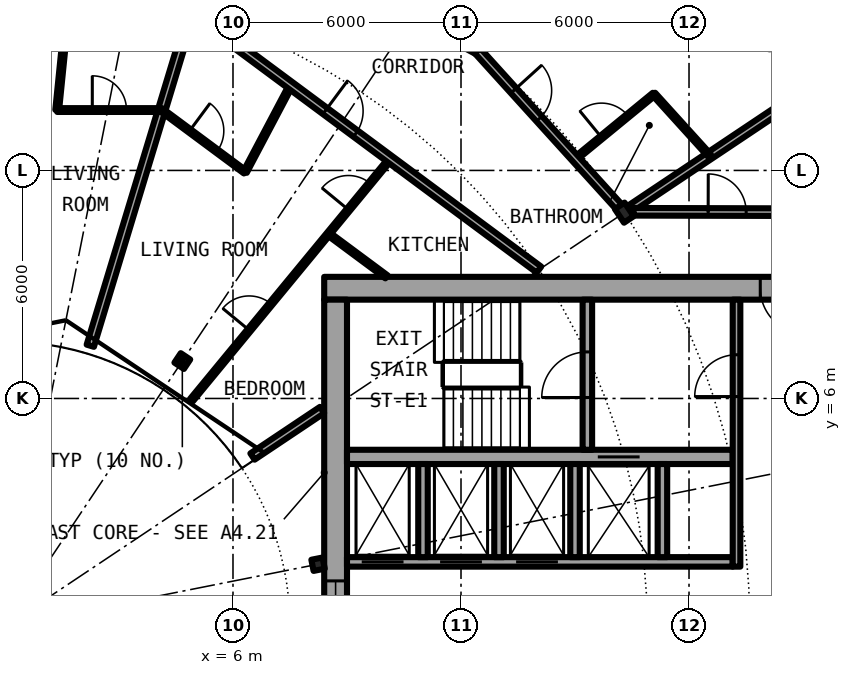
"""IFC4 building model, lengths in metres.
Left out: names, types, materials, properties, quantities, classifications, styles, units other than length and angle.
Written with IfcOpenShell. Run it as: python <this file> out.ifc"""

import sys

from ifc_helpers import new_model, si_unit, direction, frame, frame_2d, origin, origin_2d, place, context, subcontext, project, spatial, rectangle, i_section, extrude, element, fill, save


model = new_model("IFC4")
c1 = context("Model", 3, precision=1e-05, world=origin(), true_north=direction((0.0, 1.0)))
c2 = subcontext(c1, "Body", "Model", "MODEL_VIEW")
j1 = project(units=[si_unit("LENGTHUNIT", "METRE"), si_unit("PLANEANGLEUNIT", "RADIAN")], contexts=[c1])
p1 = place(None, origin())
s1 = spatial("IfcSite", under=j1, at=p1, CompositionType="ELEMENT")
p2 = place(p1, origin())
s2 = spatial("IfcBuilding", under=s1, at=p2, CompositionType="ELEMENT")
p3 = place(p2, frame((0.0, 0.0, 117.75)))
s3 = spatial("IfcBuildingStorey", under=s2, at=p3, CompositionType="ELEMENT", Elevation=117.75)
p4 = place(p3, frame((16.297, 10.889, 0.0), z_axis=(0.0, 0.0, 1.0), x_axis=(0.831469612303, 0.55557023302, 0.0)))
e1 = element("IfcColumn", 1, at=p4, inside=s3, PredefinedType="COLUMN", context=c2, shape_type="SweptSolid", body=[
    extrude(i_section(OverallWidth=0.307, OverallDepth=0.432, WebThickness=0.021, FlangeThickness=0.04, FilletRadius=0.027, at=origin_2d()), origin(), (0.0, 0.0, 1.0), 3.05),
])
for number, where, z_axis, x_axis in (
    (2, (8.239, 1.639, 0.0), (0.0, 0.0, 1.0), (0.981, 0.195, 0.0)),
    (3, (4.667, 6.984, 0.0), (0.0, 0.0, 1.0), (0.556, 0.831, 0.0)),
):
    element("IfcColumn", number, at=place(p3, frame(where, z_axis=z_axis, x_axis=x_axis)), inside=s3, PredefinedType="COLUMN", context=c2, shape_type="SweptSolid", body=[
        extrude(i_section(OverallWidth=0.3, OverallDepth=0.3, WebThickness=0.011, FlangeThickness=0.019, FilletRadius=0.027, at=origin_2d()), origin(), (0.0, 0.0, 1.0), 3.05),
    ])
p5 = place(p3, frame((22.699, 15.167, 0.0), z_axis=(0.0, 0.0, 1.0), x_axis=(-0.634382322723, 0.773019449054, 0.0)))
e4 = element("IfcWall", 4, at=p5, inside=s3, PredefinedType="SOLIDWALL", context=c2, shape_type="SweptSolid", body=[
    extrude(rectangle(XDim=5.352, YDim=0.25, at=frame_2d((2.676, 0.0))), origin(), (0.0, 0.0, 1.0), 2.7),
])
p6 = place(p5, frame((0.441, 0.0, 0.3)))
e5 = element("IfcOpeningElement", 5, at=p6, cuts=e4, PredefinedType="OPENING", context=c2, shape_type="SweptSolid", body=[
    extrude(rectangle(XDim=1.8, YDim=2.1, at=frame_2d((0.9, 1.05))), frame((0.0, 0.135, 0.0), z_axis=(0.0, -1.0, 0.0), x_axis=(1.0, 0.0, 0.0)), (0.0, 0.0, 1.0), 0.27),
])
p7 = place(p5, frame((3.51, 0.0, 0.0)))
e6 = element("IfcOpeningElement", 6, at=p7, cuts=e4, PredefinedType="OPENING", context=c2, shape_type="SweptSolid", body=[
    extrude(rectangle(XDim=1.0, YDim=2.2, at=frame_2d((0.5, 1.1))), frame((0.0, 0.135, 0.0), z_axis=(0.0, -1.0, 0.0), x_axis=(1.0, 0.0, 0.0)), (0.0, 0.0, 1.0), 0.27),
])
p8 = place(p3, frame((22.2, 8.9, 0.0), z_axis=(0.0, 0.0, 1.0), x_axis=(-1.0, 0.0, 0.0)))
e7 = element("IfcWall", 7, at=p8, inside=s3, PredefinedType="SHEAR", context=c2, shape_type="SweptSolid", body=[
    extrude(rectangle(XDim=13.8, YDim=0.6, at=frame_2d((6.9, 0.0))), origin(), (0.0, 0.0, 1.0), 3.05),
])
p9 = place(p8, frame((1.125, 0.0, 0.0)))
e8 = element("IfcOpeningElement", 8, at=p9, cuts=e7, PredefinedType="OPENING", context=c2, shape_type="SweptSolid", body=[
    extrude(rectangle(XDim=1.2, YDim=2.3, at=frame_2d((0.6, 1.15))), frame((0.0, 0.31, 0.0), z_axis=(0.0, -1.0, 0.0), x_axis=(1.0, 0.0, 0.0)), (0.0, 0.0, 1.0), 0.62),
])
p10 = place(p3, frame((8.7, -8.6, 0.0), z_axis=(0.0, 0.0, 1.0), x_axis=(0.0, 1.0, 0.0)))
e9 = element("IfcWall", 9, at=p10, inside=s3, PredefinedType="SHEAR", context=c2, shape_type="SweptSolid", body=[
    extrude(rectangle(XDim=17.2, YDim=0.6, at=frame_2d((8.6, 0.0))), origin(), (0.0, 0.0, 1.0), 3.05),
])
p11 = place(p10, frame((7.4, 0.0, 0.1)))
e10 = element("IfcOpeningElement", 10, at=p11, cuts=e9, PredefinedType="OPENING", context=c2, shape_type="SweptSolid", body=[
    extrude(rectangle(XDim=2.4, YDim=2.2, at=frame_2d((1.2, 1.1))), frame((0.0, 0.31, 0.0), z_axis=(0.0, -1.0, 0.0), x_axis=(1.0, 0.0, 0.0)), (0.0, 0.0, 1.0), 0.62),
])
p12 = place(p3, frame((9.0, 1.7, 0.0), z_axis=(0.0, 0.0, 1.0), x_axis=(1.0, 0.0, 0.0)))
e11 = element("IfcWall", 11, at=p12, inside=s3, PredefinedType="SHEAR", context=c2, shape_type="SweptSolid", body=[
    extrude(rectangle(XDim=10.15, YDim=0.25, at=frame_2d((5.075, 0.0))), origin(), (0.0, 0.0, 1.0), 3.05),
])
p13 = place(p12, frame((0.387, 0.0, 0.0)))
e12 = element("IfcOpeningElement", 12, at=p13, cuts=e11, PredefinedType="OPENING", context=c2, shape_type="SweptSolid", body=[
    extrude(rectangle(XDim=1.1, YDim=2.3, at=frame_2d((0.55, 1.15))), frame((0.0, 0.135, 0.0), z_axis=(0.0, -1.0, 0.0), x_axis=(1.0, 0.0, 0.0)), (0.0, 0.0, 1.0), 0.27),
])
p14 = place(p12, frame((2.45, 0.0, 0.0)))
e13 = element("IfcOpeningElement", 13, at=p14, cuts=e11, PredefinedType="OPENING", context=c2, shape_type="SweptSolid", body=[
    extrude(rectangle(XDim=1.1, YDim=2.3, at=frame_2d((0.55, 1.15))), frame((0.0, 0.135, 0.0), z_axis=(0.0, -1.0, 0.0), x_axis=(1.0, 0.0, 0.0)), (0.0, 0.0, 1.0), 0.27),
])
p15 = place(p12, frame((4.45, 0.0, 0.0)))
e14 = element("IfcOpeningElement", 14, at=p15, cuts=e11, PredefinedType="OPENING", context=c2, shape_type="SweptSolid", body=[
    extrude(rectangle(XDim=1.1, YDim=2.3, at=frame_2d((0.55, 1.15))), frame((0.0, 0.135, 0.0), z_axis=(0.0, -1.0, 0.0), x_axis=(1.0, 0.0, 0.0)), (0.0, 0.0, 1.0), 0.27),
])
p16 = place(p3, frame((9.0, 4.462, 0.0), z_axis=(0.0, 0.0, 1.0), x_axis=(1.0, 0.0, 0.0)))
e15 = element("IfcWall", 15, at=p16, inside=s3, PredefinedType="SHEAR", context=c2, shape_type="SweptSolid", body=[
    extrude(rectangle(XDim=10.15, YDim=0.375, at=frame_2d((5.075, 0.0))), origin(), (0.0, 0.0, 1.0), 3.05),
])
p17 = place(p16, frame((6.6, 0.0, 0.0)))
e16 = element("IfcOpeningElement", 16, at=p17, cuts=e15, PredefinedType="OPENING", context=c2, shape_type="SweptSolid", body=[
    extrude(rectangle(XDim=1.1, YDim=2.3, at=frame_2d((0.55, 1.15))), frame((0.0, 0.198, 0.0), z_axis=(0.0, -1.0, 0.0), x_axis=(1.0, 0.0, 0.0)), (0.0, 0.0, 1.0), 0.395),
])
p18 = place(p3, frame((15.325, 4.65, 0.0), z_axis=(0.0, 0.0, 1.0), x_axis=(0.0, 1.0, 0.0)))
e17 = element("IfcWall", 17, at=p18, inside=s3, PredefinedType="SHEAR", context=c2, shape_type="SweptSolid", body=[
    extrude(rectangle(XDim=3.95, YDim=0.25, at=frame_2d((1.975, 0.0))), origin(), (0.0, 0.0, 1.0), 3.05),
])
p19 = place(p18, frame((1.375, 0.0, 0.0)))
e18 = element("IfcOpeningElement", 18, at=p19, cuts=e17, PredefinedType="OPENING", context=c2, shape_type="SweptSolid", body=[
    extrude(rectangle(XDim=1.2, YDim=2.3, at=frame_2d((0.6, 1.15))), frame((0.0, 0.135, 0.0), z_axis=(0.0, -1.0, 0.0), x_axis=(1.0, 0.0, 0.0)), (0.0, 0.0, 1.0), 0.27),
])
for number, where, z_axis, x_axis in (
    (19, (15.0, 1.825, 0.0), (0.0, 0.0, 1.0), (0.0, 1.0, 0.0)),
    (20, (17.3, 1.825, 0.0), (0.0, 0.0, 1.0), (0.0, 1.0, 0.0)),
):
    element("IfcWall", number, at=place(p3, frame(where, z_axis=z_axis, x_axis=x_axis)), inside=s3, PredefinedType="SOLIDWALL", context=c2, shape_type="SweptSolid", body=[
        extrude(rectangle(XDim=2.45, YDim=0.25, at=frame_2d((1.225, 0.0))), origin(), (0.0, 0.0, 1.0), 2.7),
    ])
p20 = place(p3, frame((19.25, 1.575, 0.0), z_axis=(0.0, 0.0, 1.0), x_axis=(0.0, 1.0, 0.0)))
e21 = element("IfcWall", 21, at=p20, inside=s3, PredefinedType="SOLIDWALL", context=c2, shape_type="SweptSolid", body=[
    extrude(rectangle(XDim=7.025, YDim=0.2, at=frame_2d((3.513, 0.0))), origin(), (0.0, 0.0, 1.0), 2.7),
])
p21 = place(p20, frame((4.475, 0.0, 0.0)))
e22 = element("IfcOpeningElement", 22, at=p21, cuts=e21, PredefinedType="OPENING", context=c2, shape_type="SweptSolid", body=[
    extrude(rectangle(XDim=1.1, YDim=2.3, at=frame_2d((0.55, 1.15))), frame((0.0, 0.11, 0.0), z_axis=(0.0, -1.0, 0.0), x_axis=(1.0, 0.0, 0.0)), (0.0, 0.0, 1.0), 0.22),
])
for number, where, z_axis, x_axis in (
    (23, (11.0, 1.825, 0.0), (0.0, 0.0, 1.0), (0.0, 1.0, 0.0)),
    (24, (13.0, 1.825, 0.0), (0.0, 0.0, 1.0), (0.0, 1.0, 0.0)),
):
    element("IfcWall", number, at=place(p3, frame(where, z_axis=z_axis, x_axis=x_axis)), inside=s3, PredefinedType="SOLIDWALL", context=c2, shape_type="SweptSolid", body=[
        extrude(rectangle(XDim=2.45, YDim=0.25, at=frame_2d((1.225, 0.0))), origin(), (0.0, 0.0, 1.0), 2.7),
    ])
p22 = place(p3, frame((2.245, 7.387, 0.0), z_axis=(0.0, 0.0, 1.0), x_axis=(0.289977130626, 0.957033575019, 0.0)))
e25 = element("IfcWall", 25, at=p22, inside=s3, PredefinedType="PARTITIONING", context=c2, shape_type="SweptSolid", body=[
    extrude(rectangle(XDim=9.18, YDim=0.2, at=frame_2d((4.59, 0.0))), origin(), (0.0, 0.0, 1.0), 2.7),
])
p23 = place(p3, frame((1.374, 13.589, 0.0), z_axis=(0.0, 0.0, 1.0), x_axis=(0.100527855112, 0.994934244233, 0.0)))
e26 = element("IfcWall", 26, at=p23, inside=s3, PredefinedType="PARTITIONING", context=c2, shape_type="SweptSolid", body=[
    extrude(rectangle(XDim=2.596, YDim=0.1, at=frame_2d((1.298, 0.0))), origin(), (0.0, 0.0, 1.0), 2.7),
])
p24 = place(p3, frame((4.909, 5.958, 0.0), z_axis=(0.0, 0.0, 1.0), x_axis=(0.635976043025, 0.771708800454, 0.0)))
e27 = element("IfcWall", 27, at=p24, inside=s3, PredefinedType="PARTITIONING", context=c2, shape_type="SweptSolid", body=[
    extrude(rectangle(XDim=8.213, YDim=0.1, at=frame_2d((4.106, 0.0))), origin(), (0.0, 0.0, 1.0), 2.7),
])
p25 = place(p24, frame((6.49, 0.0, 0.0)))
e28 = element("IfcOpeningElement", 28, at=p25, cuts=e27, PredefinedType="OPENING", context=c2, shape_type="SweptSolid", body=[
    extrude(rectangle(XDim=0.9, YDim=2.3, at=frame_2d((0.45, 1.15))), frame((0.0, 0.06, 0.0), z_axis=(0.0, -1.0, 0.0), x_axis=(1.0, 0.0, 0.0)), (0.0, 0.0, 1.0), 0.12),
])
p26 = place(p24, frame((2.384, 0.0, 0.0)))
e29 = element("IfcOpeningElement", 29, at=p26, cuts=e27, PredefinedType="OPENING", context=c2, shape_type="SweptSolid", body=[
    extrude(rectangle(XDim=0.9, YDim=2.3, at=frame_2d((0.45, 1.15))), frame((0.0, 0.06, 0.0), z_axis=(0.0, -1.0, 0.0), x_axis=(1.0, 0.0, 0.0)), (0.0, 0.0, 1.0), 0.12),
])
p27 = place(p3, frame((6.318, 11.96, 0.0), z_axis=(0.0, 0.0, 1.0), x_axis=(0.467001992543, 0.884256263173, 0.0)))
e30 = element("IfcWall", 30, at=p27, inside=s3, PredefinedType="PARTITIONING", context=c2, shape_type="SweptSolid", body=[
    extrude(rectangle(XDim=2.572, YDim=0.1, at=frame_2d((1.286, 0.0))), origin(), (0.0, 0.0, 1.0), 2.7),
])
p28 = place(p3, frame((12.436, 15.149, 0.0), z_axis=(0.0, 0.0, 1.0), x_axis=(0.63447412651, 0.772944100689, 0.0)))
e31 = element("IfcWall", 31, at=p28, inside=s3, PredefinedType="PARTITIONING", context=c2, shape_type="SweptSolid", body=[
    extrude(rectangle(XDim=7.576, YDim=0.2, at=frame_2d((3.788, 0.0))), origin(), (0.0, 0.0, 1.0), 2.7),
])
p29 = place(p3, frame((15.01, 12.309, 0.0), z_axis=(0.0, 0.0, 1.0), x_axis=(0.773240932873, 0.634112339992, 0.0)))
e32 = element("IfcWall", 32, at=p29, inside=s3, PredefinedType="PARTITIONING", context=c2, shape_type="SweptSolid", body=[
    extrude(rectangle(XDim=2.674, YDim=0.1, at=frame_2d((1.337, 0.0))), origin(), (0.0, 0.0, 1.0), 2.7),
])
p30 = place(p29, frame((0.887, 0.0, 0.0)))
e33 = element("IfcOpeningElement", 33, at=p30, cuts=e32, PredefinedType="OPENING", context=c2, shape_type="SweptSolid", body=[
    extrude(rectangle(XDim=0.9, YDim=2.3, at=frame_2d((0.45, 1.15))), frame((0.0, 0.06, 0.0), z_axis=(0.0, -1.0, 0.0), x_axis=(1.0, 0.0, 0.0)), (0.0, 0.0, 1.0), 0.12),
])
p31 = place(p3, frame((16.477, 11.009, 0.0), z_axis=(0.0, 0.0, 1.0), x_axis=(0.831406593008, 0.555664536482, 0.0)))
e34 = element("IfcWall", 34, at=p31, inside=s3, PredefinedType="PARTITIONING", context=c2, shape_type="SweptSolid", body=[
    extrude(rectangle(XDim=7.358, YDim=0.2, at=frame_2d((3.679, 0.0))), origin(), (0.0, 0.0, 1.0), 2.7),
])
p32 = place(p3, frame((6.513, 4.472, 0.0), z_axis=(0.0, 0.0, 1.0), x_axis=(0.831333375071, 0.555774072347, 0.0)))
e35 = element("IfcWall", 35, at=p32, inside=s3, PredefinedType="PARTITIONING", context=c2, shape_type="SweptSolid", body=[
    extrude(rectangle(XDim=2.203, YDim=0.2, at=frame_2d((1.101, 0.0))), origin(), (0.0, 0.0, 1.0), 2.7),
])
p33 = place(p3, frame((16.541, 10.912, 0.0), z_axis=(0.0, 0.0, 1.0), x_axis=(0.999997173357, -0.002377662213, 0.0)))
e36 = element("IfcWall", 36, at=p33, inside=s3, PredefinedType="PARTITIONING", context=c2, shape_type="SweptSolid", body=[
    extrude(rectangle(XDim=5.134, YDim=0.2, at=frame_2d((2.567, 0.0))), origin(), (0.0, 0.0, 1.0), 2.7),
])
p34 = place(p33, frame((1.963, 0.0, 0.0)))
e37 = element("IfcOpeningElement", 37, at=p34, cuts=e36, PredefinedType="OPENING", context=c2, shape_type="SweptSolid", body=[
    extrude(rectangle(XDim=1.0, YDim=2.3, at=frame_2d((0.5, 1.15))), frame((0.0, 0.11, 0.0), z_axis=(0.0, -1.0, 0.0), x_axis=(1.0, 0.0, 0.0)), (0.0, 0.0, 1.0), 0.22),
])
p35 = place(p3, frame((4.122, 13.589, 0.0), z_axis=(0.0, 0.0, 1.0), x_axis=(0.803128348509, -0.595806055542, 0.0)))
e38 = element("IfcWall", 38, at=p35, inside=s3, PredefinedType="PARTITIONING", context=c2, shape_type="SweptSolid", body=[
    extrude(rectangle(XDim=2.734, YDim=0.1, at=frame_2d((1.367, 0.0))), origin(), (0.0, 0.0, 1.0), 2.7),
])
p36 = place(p35, frame((0.917, 0.0, 0.0)))
e39 = element("IfcOpeningElement", 39, at=p36, cuts=e38, PredefinedType="OPENING", context=c2, shape_type="SweptSolid", body=[
    extrude(rectangle(XDim=0.9, YDim=2.3, at=frame_2d((0.45, 1.15))), frame((0.0, 0.06, 0.0), z_axis=(0.0, -1.0, 0.0), x_axis=(1.0, 0.0, 0.0)), (0.0, 0.0, 1.0), 0.12),
])
p37 = place(p3, frame((8.513, 10.332, 0.0), z_axis=(0.0, 0.0, 1.0), x_axis=(0.803149591038, -0.595777420196, 0.0)))
e40 = element("IfcWall", 40, at=p37, inside=s3, PredefinedType="PARTITIONING", context=c2, shape_type="SweptSolid", body=[
    extrude(rectangle(XDim=1.9, YDim=0.1, at=frame_2d((0.95, 0.0))), origin(), (0.0, 0.0, 1.0), 2.7),
])
p38 = place(p3, frame((1.374, 13.589, 0.0), z_axis=(0.0, 0.0, 1.0), x_axis=(1.0, 0.0, 0.0)))
e41 = element("IfcWall", 41, at=p38, inside=s3, PredefinedType="PARTITIONING", context=c2, shape_type="SweptSolid", body=[
    extrude(rectangle(XDim=2.748, YDim=0.1, at=frame_2d((1.374, 0.0))), origin(), (0.0, 0.0, 1.0), 2.7),
])
p39 = place(p38, frame((0.924, 0.0, 0.0)))
e42 = element("IfcOpeningElement", 42, at=p39, cuts=e41, PredefinedType="OPENING", context=c2, shape_type="SweptSolid", body=[
    extrude(rectangle(XDim=0.9, YDim=2.3, at=frame_2d((0.45, 1.15))), frame((0.0, 0.06, 0.0), z_axis=(0.0, -1.0, 0.0), x_axis=(1.0, 0.0, 0.0)), (0.0, 0.0, 1.0), 0.12),
])
p40 = place(p3, frame((4.906, 16.172, 0.0), z_axis=(0.0, 0.0, 1.0), x_axis=(0.803204584823, -0.59570327758, 0.0)))
e43 = element("IfcWall", 43, at=p40, inside=s3, PredefinedType="PARTITIONING", context=c2, shape_type="SweptSolid", body=[
    extrude(rectangle(XDim=11.387, YDim=0.2, at=frame_2d((5.693, 0.0))), origin(), (0.0, 0.0, 1.0), 2.7),
])
p41 = place(p40, frame((4.38, 0.0, 0.0)))
e44 = element("IfcOpeningElement", 44, at=p41, cuts=e43, PredefinedType="OPENING", context=c2, shape_type="SweptSolid", body=[
    extrude(rectangle(XDim=1.0, YDim=2.3, at=frame_2d((0.5, 1.15))), frame((0.0, 0.11, 0.0), z_axis=(0.0, -1.0, 0.0), x_axis=(1.0, 0.0, 0.0)), (0.0, 0.0, 1.0), 0.22),
])
p42 = place(p3, frame((5.687, 18.757, 0.0), z_axis=(0.0, 0.0, 1.0), x_axis=(0.8819312112, -0.471378127104, 0.0)))
e45 = element("IfcWall", 45, at=p42, inside=s3, PredefinedType="PARTITIONING", context=c2, shape_type="SweptSolid", body=[
    extrude(rectangle(XDim=7.65, YDim=0.2, at=frame_2d((3.825, 0.0))), origin(), (0.0, 0.0, 1.0), 2.39),
])
p43 = place(p42, frame((2.371, 0.0, 0.0)))
e46 = element("IfcOpeningElement", 46, at=p43, cuts=e45, PredefinedType="OPENING", context=c2, shape_type="SweptSolid", body=[
    extrude(rectangle(XDim=1.0, YDim=2.3, at=frame_2d((0.5, 1.15))), frame((0.0, 0.11, 0.0), z_axis=(0.0, -1.0, 0.0), x_axis=(1.0, 0.0, 0.0)), (0.0, 0.0, 1.0), 0.22),
])
p44 = place(p3, frame((12.434, 15.151, 0.0), z_axis=(0.0, 0.0, 1.0), x_axis=(0.671481997275, -0.741020868354, 0.0)))
e47 = element("IfcWall", 47, at=p44, inside=s3, PredefinedType="PARTITIONING", context=c2, shape_type="SweptSolid", body=[
    extrude(rectangle(XDim=5.596, YDim=0.2, at=frame_2d((2.798, 0.0))), origin(), (0.0, 0.0, 1.0), 2.39),
])
p45 = place(p44, frame((1.417, 0.0, 0.0)))
e48 = element("IfcOpeningElement", 48, at=p45, cuts=e47, PredefinedType="OPENING", context=c2, shape_type="SweptSolid", body=[
    extrude(rectangle(XDim=1.0, YDim=2.3, at=frame_2d((0.5, 1.15))), frame((0.0, 0.11, 0.0), z_axis=(0.0, -1.0, 0.0), x_axis=(1.0, 0.0, 0.0)), (0.0, 0.0, 1.0), 0.22),
])
p46 = place(p3, frame((17.072, 14.011, 0.0), z_axis=(0.0, 0.0, 1.0), x_axis=(0.67169789574, -0.740825172937, 0.0)))
e49 = element("IfcWall", 49, at=p46, inside=s3, PredefinedType="PARTITIONING", context=c2, shape_type="SweptSolid", body=[
    extrude(rectangle(XDim=2.183, YDim=0.1, at=frame_2d((1.091, 0.0))), origin(), (0.0, 0.0, 1.0), 2.7),
])
p47 = place(p13, origin())
e50 = element("IfcDoor", 50, at=p47, inside=s3, OperationType="DOUBLE_DOOR_SLIDING", PredefinedType="DOOR", context=c2, shape_type="SweptSolid", body=[
    extrude(rectangle(XDim=1.1, YDim=2.3, at=frame_2d((0.55, 1.15))), frame((0.0, 0.025, 0.0), z_axis=(0.0, -1.0, 0.0), x_axis=(1.0, 0.0, 0.0)), (0.0, 0.0, 1.0), 0.05),
])
fill(e12, e50)
p48 = place(p14, origin())
e51 = element("IfcDoor", 51, at=p48, inside=s3, OperationType="DOUBLE_DOOR_SLIDING", PredefinedType="DOOR", context=c2, shape_type="SweptSolid", body=[
    extrude(rectangle(XDim=1.1, YDim=2.3, at=frame_2d((0.55, 1.15))), frame((0.0, 0.025, 0.0), z_axis=(0.0, -1.0, 0.0), x_axis=(1.0, 0.0, 0.0)), (0.0, 0.0, 1.0), 0.05),
])
fill(e13, e51)
p49 = place(p15, origin())
e52 = element("IfcDoor", 52, at=p49, inside=s3, OperationType="DOUBLE_DOOR_SLIDING", PredefinedType="DOOR", context=c2, shape_type="SweptSolid", body=[
    extrude(rectangle(XDim=1.1, YDim=2.3, at=frame_2d((0.55, 1.15))), frame((0.0, 0.025, 0.0), z_axis=(0.0, -1.0, 0.0), x_axis=(1.0, 0.0, 0.0)), (0.0, 0.0, 1.0), 0.05),
])
fill(e14, e52)
p50 = place(p17, origin())
e53 = element("IfcDoor", 53, at=p50, inside=s3, OperationType="DOUBLE_DOOR_SLIDING", PredefinedType="DOOR", context=c2, shape_type="SweptSolid", body=[
    extrude(rectangle(XDim=1.1, YDim=2.3, at=frame_2d((0.55, 1.15))), frame((0.0, 0.025, 0.0), z_axis=(0.0, -1.0, 0.0), x_axis=(1.0, 0.0, 0.0)), (0.0, 0.0, 1.0), 0.05),
])
fill(e16, e53)
p51 = place(p19, origin())
e54 = element("IfcDoor", 54, at=p51, inside=s3, OperationType="SINGLE_SWING_LEFT", PredefinedType="DOOR", context=c2, shape_type="SweptSolid", body=[
    extrude(rectangle(XDim=1.2, YDim=2.3, at=frame_2d((0.6, 1.15))), frame((0.0, 0.025, 0.0), z_axis=(0.0, -1.0, 0.0), x_axis=(1.0, 0.0, 0.0)), (0.0, 0.0, 1.0), 0.05),
])
fill(e18, e54)
p52 = place(p21, origin())
e55 = element("IfcDoor", 55, at=p52, inside=s3, OperationType="SINGLE_SWING_LEFT", PredefinedType="DOOR", context=c2, shape_type="SweptSolid", body=[
    extrude(rectangle(XDim=1.1, YDim=2.3, at=frame_2d((0.55, 1.15))), frame((0.0, 0.025, 0.0), z_axis=(0.0, -1.0, 0.0), x_axis=(1.0, 0.0, 0.0)), (0.0, 0.0, 1.0), 0.05),
])
fill(e22, e55)
p53 = place(p9, origin())
e56 = element("IfcDoor", 56, at=p53, inside=s3, OperationType="SINGLE_SWING_RIGHT", PredefinedType="DOOR", context=c2, shape_type="SweptSolid", body=[
    extrude(rectangle(XDim=1.2, YDim=2.3, at=frame_2d((0.6, 1.15))), frame((0.0, 0.025, 0.0), z_axis=(0.0, -1.0, 0.0), x_axis=(1.0, 0.0, 0.0)), (0.0, 0.0, 1.0), 0.05),
])
fill(e8, e56)
p54 = place(p11, origin())
e57 = element("IfcWindow", 57, at=p54, inside=s3, PartitioningType="SINGLE_PANEL", PredefinedType="WINDOW", context=c2, shape_type="SweptSolid", body=[
    extrude(rectangle(XDim=2.4, YDim=2.2, at=frame_2d((1.2, 1.1))), frame((0.0, 0.03, 0.0), z_axis=(0.0, -1.0, 0.0), x_axis=(1.0, 0.0, 0.0)), (0.0, 0.0, 1.0), 0.06),
])
fill(e10, e57)
p55 = place(p45, origin())
e58 = element("IfcDoor", 58, at=p55, inside=s3, OperationType="SINGLE_SWING_LEFT", PredefinedType="DOOR", context=c2, shape_type="SweptSolid", body=[
    extrude(rectangle(XDim=1.0, YDim=2.3, at=frame_2d((0.5, 1.15))), frame((0.0, 0.025, 0.0), z_axis=(0.0, -1.0, 0.0), x_axis=(1.0, 0.0, 0.0)), (0.0, 0.0, 1.0), 0.05),
])
fill(e48, e58)
p56 = place(p30, origin())
e59 = element("IfcDoor", 59, at=p56, inside=s3, OperationType="SINGLE_SWING_LEFT", PredefinedType="DOOR", context=c2, shape_type="SweptSolid", body=[
    extrude(rectangle(XDim=0.9, YDim=2.3, at=frame_2d((0.45, 1.15))), frame((0.0, 0.025, 0.0), z_axis=(0.0, -1.0, 0.0), x_axis=(1.0, 0.0, 0.0)), (0.0, 0.0, 1.0), 0.05),
])
fill(e33, e59)
p57 = place(p41, origin())
e60 = element("IfcDoor", 60, at=p57, inside=s3, OperationType="SINGLE_SWING_LEFT", PredefinedType="DOOR", context=c2, shape_type="SweptSolid", body=[
    extrude(rectangle(XDim=1.0, YDim=2.3, at=frame_2d((0.5, 1.15))), frame((0.0, 0.025, 0.0), z_axis=(0.0, -1.0, 0.0), x_axis=(1.0, 0.0, 0.0)), (0.0, 0.0, 1.0), 0.05),
])
fill(e44, e60)
p58 = place(p36, origin())
e61 = element("IfcDoor", 61, at=p58, inside=s3, OperationType="SINGLE_SWING_LEFT", PredefinedType="DOOR", context=c2, shape_type="SweptSolid", body=[
    extrude(rectangle(XDim=0.9, YDim=2.3, at=frame_2d((0.45, 1.15))), frame((0.0, 0.025, 0.0), z_axis=(0.0, -1.0, 0.0), x_axis=(1.0, 0.0, 0.0)), (0.0, 0.0, 1.0), 0.05),
])
fill(e39, e61)
p59 = place(p25, origin())
e62 = element("IfcDoor", 62, at=p59, inside=s3, OperationType="SINGLE_SWING_RIGHT", PredefinedType="DOOR", context=c2, shape_type="SweptSolid", body=[
    extrude(rectangle(XDim=0.9, YDim=2.3, at=frame_2d((0.45, 1.15))), frame((0.0, 0.025, 0.0), z_axis=(0.0, -1.0, 0.0), x_axis=(1.0, 0.0, 0.0)), (0.0, 0.0, 1.0), 0.05),
])
fill(e28, e62)
p60 = place(p26, origin())
e63 = element("IfcDoor", 63, at=p60, inside=s3, OperationType="SINGLE_SWING_LEFT", PredefinedType="DOOR", context=c2, shape_type="SweptSolid", body=[
    extrude(rectangle(XDim=0.9, YDim=2.3, at=frame_2d((0.45, 1.15))), frame((0.0, 0.025, 0.0), z_axis=(0.0, -1.0, 0.0), x_axis=(1.0, 0.0, 0.0)), (0.0, 0.0, 1.0), 0.05),
])
fill(e29, e63)
p61 = place(p39, origin())
e64 = element("IfcDoor", 64, at=p61, inside=s3, OperationType="SINGLE_SWING_RIGHT", PredefinedType="DOOR", context=c2, shape_type="SweptSolid", body=[
    extrude(rectangle(XDim=0.9, YDim=2.3, at=frame_2d((0.45, 1.15))), frame((0.0, 0.025, 0.0), z_axis=(0.0, -1.0, 0.0), x_axis=(1.0, 0.0, 0.0)), (0.0, 0.0, 1.0), 0.05),
])
fill(e42, e64)
p62 = place(p34, origin())
e65 = element("IfcDoor", 65, at=p62, inside=s3, OperationType="SINGLE_SWING_LEFT", PredefinedType="DOOR", context=c2, shape_type="SweptSolid", body=[
    extrude(rectangle(XDim=1.0, YDim=2.3, at=frame_2d((0.5, 1.15))), frame((0.0, 0.025, 0.0), z_axis=(0.0, -1.0, 0.0), x_axis=(1.0, 0.0, 0.0)), (0.0, 0.0, 1.0), 0.05),
])
fill(e37, e65)
save(model, sys.argv[1])
